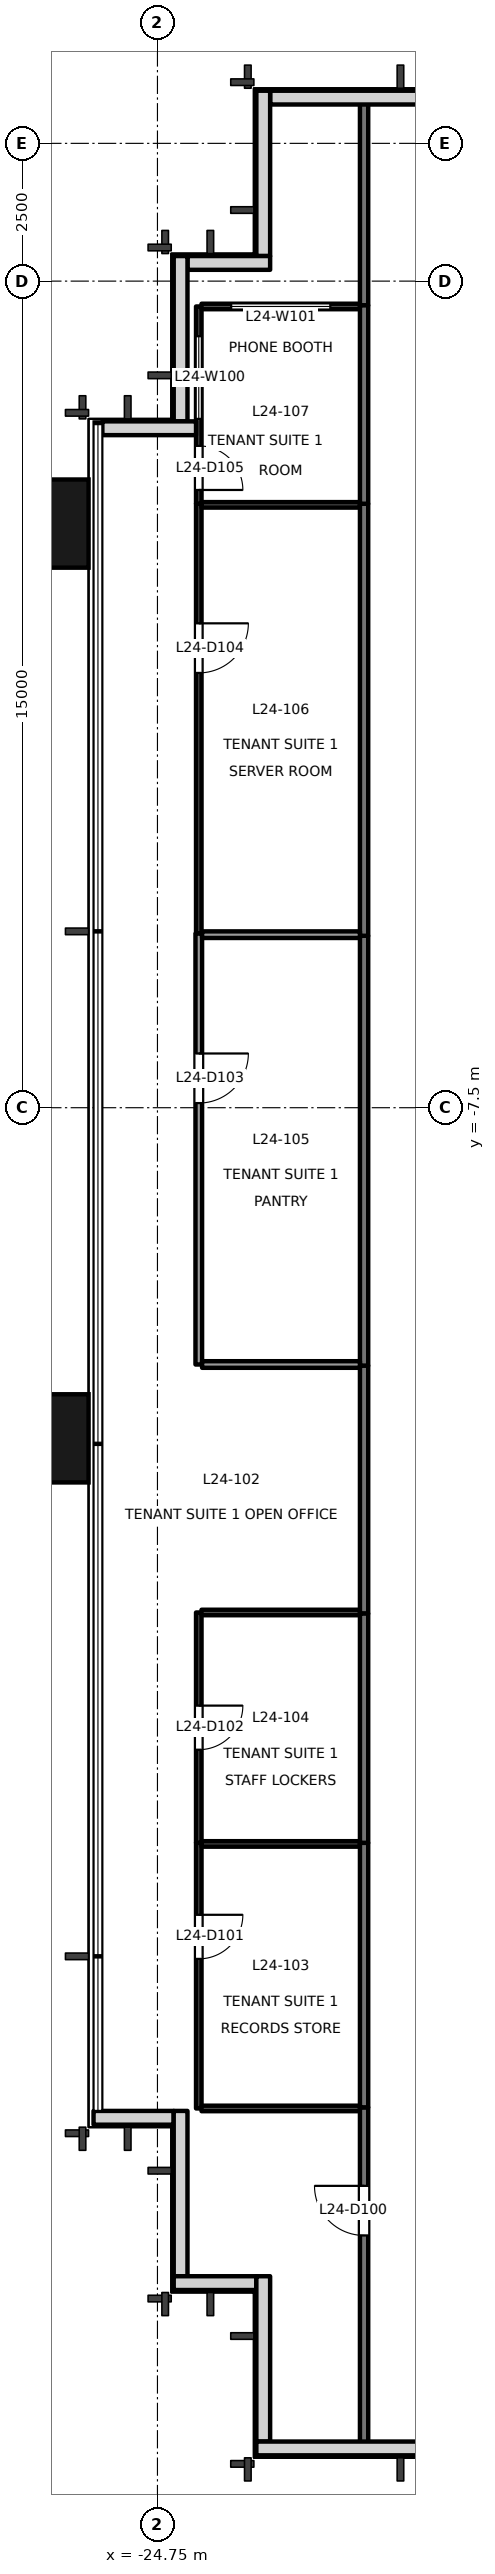
"""IFC4 building model, lengths in metres.
Left out: names, types, materials, properties, quantities, classifications, styles, units other than length and angle.
Written with IfcOpenShell. Run it as: python <this file> out.ifc"""

import sys

from ifc_helpers import new_model, si_unit, direction, frame, frame_2d, origin, origin_2d, place, context, subcontext, project, spatial, rectangle, extrude, element, fill, save


model = new_model("IFC4")
c1 = context("Model", 3, precision=1e-05, world=origin(), true_north=direction((0.0, 1.0)))
c2 = subcontext(c1, "Body", "Model", "MODEL_VIEW")
j1 = project(units=[si_unit("LENGTHUNIT", "METRE"), si_unit("PLANEANGLEUNIT", "RADIAN")], contexts=[c1])
p1 = place(None, origin())
s1 = spatial("IfcSite", under=j1, at=p1, CompositionType="ELEMENT")
p2 = place(p1, origin())
s2 = spatial("IfcBuilding", under=s1, at=p2, CompositionType="ELEMENT")
p3 = place(p2, frame((0.0, 0.0, 107.7)))
s3 = spatial("IfcBuildingStorey", under=s2, at=p3, CompositionType="ELEMENT", Elevation=107.7)
for number, where, z_axis, x_axis in (
    (1, (-26.9, -13.5, -0.2), (0.0, 0.0, 1.0), (0.0, 1.0, 0.0)),
    (2, (-26.9, 3.1, -0.2), (0.0, 0.0, 1.0), (0.0, 1.0, 0.0)),
):
    element("IfcColumn", number, at=place(p3, frame(where, z_axis=z_axis, x_axis=x_axis)), inside=s3, PredefinedType="COLUMN", context=c2, shape_type="SweptSolid", body=[
        extrude(rectangle(XDim=1.6, YDim=1.8, at=origin_2d()), origin(), (0.0, 0.0, 1.0), 4.0),
    ])
p4 = place(p3, frame((-20.0, 10.83, 0.0), z_axis=(0.0, 0.0, 1.0), x_axis=(-1.0, 0.0, 0.0)))
e3 = element("IfcWall", 3, at=p4, inside=s3, PredefinedType="SOLIDWALL", context=c2, shape_type="SweptSolid", body=[
    extrude(rectangle(XDim=2.705, YDim=0.25, at=frame_2d((1.353, 0.0))), origin(), (0.0, 0.0, 1.0), 3.8),
])
p5 = place(p3, frame((-22.83, 10.955, 0.0), z_axis=(0.0, 0.0, 1.0), x_axis=(0.0, -1.0, 0.0)))
e4 = element("IfcWall", 4, at=p5, inside=s3, PredefinedType="SOLIDWALL", context=c2, shape_type="SweptSolid", body=[
    extrude(rectangle(XDim=3.0, YDim=0.25, at=frame_2d((1.5, 0.0))), origin(), (0.0, 0.0, 1.0), 3.8),
])
p6 = place(p3, frame((-22.705, 7.83, 0.0), z_axis=(0.0, 0.0, 1.0), x_axis=(-1.0, 0.0, 0.0)))
e5 = element("IfcWall", 5, at=p6, inside=s3, PredefinedType="SOLIDWALL", context=c2, shape_type="SweptSolid", body=[
    extrude(rectangle(XDim=1.5, YDim=0.25, at=frame_2d((0.75, 0.0))), origin(), (0.0, 0.0, 1.0), 3.8),
])
p7 = place(p3, frame((-24.33, 7.955, 0.0), z_axis=(0.0, 0.0, 1.0), x_axis=(0.0, -1.0, 0.0)))
e6 = element("IfcWall", 6, at=p7, inside=s3, PredefinedType="SOLIDWALL", context=c2, shape_type="SweptSolid", body=[
    extrude(rectangle(XDim=3.0, YDim=0.25, at=frame_2d((1.5, 0.0))), origin(), (0.0, 0.0, 1.0), 3.8),
])
p8 = place(p3, frame((-24.05, 4.83, 0.0), z_axis=(0.0, 0.0, 1.0), x_axis=(-1.0, 0.0, 0.0)))
e7 = element("IfcWall", 7, at=p8, inside=s3, PredefinedType="SOLIDWALL", context=c2, shape_type="SweptSolid", body=[
    extrude(rectangle(XDim=1.7, YDim=0.25, at=frame_2d((0.85, 0.0))), origin(), (0.0, 0.0, 1.0), 3.8),
])
p9 = place(p3, frame((-25.91, -25.83, 0.0), z_axis=(0.0, 0.0, 1.0), x_axis=(1.0, 0.0, 0.0)))
e8 = element("IfcWall", 8, at=p9, inside=s3, PredefinedType="SOLIDWALL", context=c2, shape_type="SweptSolid", body=[
    extrude(rectangle(XDim=1.455, YDim=0.25, at=frame_2d((0.728, 0.0))), origin(), (0.0, 0.0, 1.0), 3.8),
])
p10 = place(p3, frame((-24.33, -25.705, 0.0), z_axis=(0.0, 0.0, 1.0), x_axis=(0.0, -1.0, 0.0)))
e9 = element("IfcWall", 9, at=p10, inside=s3, PredefinedType="SOLIDWALL", context=c2, shape_type="SweptSolid", body=[
    extrude(rectangle(XDim=3.0, YDim=0.25, at=frame_2d((1.5, 0.0))), origin(), (0.0, 0.0, 1.0), 3.8),
])
p11 = place(p3, frame((-24.455, -28.83, 0.0), z_axis=(0.0, 0.0, 1.0), x_axis=(1.0, 0.0, 0.0)))
e10 = element("IfcWall", 10, at=p11, inside=s3, PredefinedType="SOLIDWALL", context=c2, shape_type="SweptSolid", body=[
    extrude(rectangle(XDim=1.5, YDim=0.25, at=frame_2d((0.75, 0.0))), origin(), (0.0, 0.0, 1.0), 3.8),
])
p12 = place(p3, frame((-22.83, -28.705, 0.0), z_axis=(0.0, 0.0, 1.0), x_axis=(0.0, -1.0, 0.0)))
e11 = element("IfcWall", 11, at=p12, inside=s3, PredefinedType="SOLIDWALL", context=c2, shape_type="SweptSolid", body=[
    extrude(rectangle(XDim=3.0, YDim=0.25, at=frame_2d((1.5, 0.0))), origin(), (0.0, 0.0, 1.0), 3.8),
])
p13 = place(p3, frame((-22.955, -31.83, 0.0), z_axis=(0.0, 0.0, 1.0), x_axis=(1.0, 0.0, 0.0)))
e12 = element("IfcWall", 12, at=p13, inside=s3, PredefinedType="SOLIDWALL", context=c2, shape_type="SweptSolid", body=[
    extrude(rectangle(XDim=2.955, YDim=0.25, at=frame_2d((1.478, 0.0))), origin(), (0.0, 0.0, 1.0), 3.8),
])
p14 = place(p3, frame((-21.0, 7.06, 0.0), z_axis=(0.0, 0.0, 1.0), x_axis=(0.0, 1.0, 0.0)))
e13 = element("IfcWall", 13, at=p14, inside=s3, PredefinedType="PARTITIONING", context=c2, shape_type="SweptSolid", body=[
    extrude(rectangle(XDim=3.68, YDim=0.15, at=frame_2d((1.84, 0.0))), origin(), (0.0, 0.0, 1.0), 3.8),
])
p15 = place(p3, frame((-21.0, -31.74, 0.0), z_axis=(0.0, 0.0, 1.0), x_axis=(0.0, 1.0, 0.0)))
e14 = element("IfcWall", 14, at=p15, inside=s3, PredefinedType="PARTITIONING", context=c2, shape_type="SweptSolid", body=[
    extrude(rectangle(XDim=6.1, YDim=0.15, at=frame_2d((3.05, 0.0))), origin(), (0.0, 0.0, 1.0), 3.8),
])
p16 = place(p15, frame((3.775, 0.0, 0.0)))
e15 = element("IfcOpeningElement", 15, at=p16, cuts=e14, PredefinedType="OPENING", context=c2, shape_type="SweptSolid", body=[
    extrude(rectangle(XDim=0.9, YDim=2.1, at=frame_2d((0.45, 1.05))), frame((0.0, 0.085, 0.0), z_axis=(0.0, -1.0, 0.0), x_axis=(1.0, 0.0, 0.0)), (0.0, 0.0, 1.0), 0.171),
])
p17 = place(p3, frame((-21.0, -16.68, 0.0), z_axis=(0.0, 0.0, 1.0), x_axis=(0.0, 1.0, 0.0)))
e16 = element("IfcWall", 16, at=p17, inside=s3, PredefinedType="PARTITIONING", context=c2, shape_type="SweptSolid", body=[
    extrude(rectangle(XDim=4.5, YDim=0.15, at=frame_2d((2.25, 0.0))), origin(), (0.0, 0.0, 1.0), 3.8),
])
p18 = place(p3, frame((-21.0, -25.64, 0.0), z_axis=(0.0, 0.0, 1.0), x_axis=(0.0, 1.0, 0.0)))
e17 = element("IfcWall", 17, at=p18, inside=s3, PredefinedType="PARTITIONING", context=c2, shape_type="SweptSolid", body=[
    extrude(rectangle(XDim=4.8, YDim=0.15, at=frame_2d((2.4, 0.0))), origin(), (0.0, 0.0, 1.0), 3.8),
])
p19 = place(p3, frame((-21.0, -20.84, 0.0), z_axis=(0.0, 0.0, 1.0), x_axis=(0.0, 1.0, 0.0)))
e18 = element("IfcWall", 18, at=p19, inside=s3, PredefinedType="PARTITIONING", context=c2, shape_type="SweptSolid", body=[
    extrude(rectangle(XDim=4.16, YDim=0.15, at=frame_2d((2.08, 0.0))), origin(), (0.0, 0.0, 1.0), 3.8),
])
p20 = place(p3, frame((-21.0, -12.18, 0.0), z_axis=(0.0, 0.0, 1.0), x_axis=(0.0, 1.0, 0.0)))
e19 = element("IfcWall", 19, at=p20, inside=s3, PredefinedType="PARTITIONING", context=c2, shape_type="SweptSolid", body=[
    extrude(rectangle(XDim=7.8, YDim=0.15, at=frame_2d((3.9, 0.0))), origin(), (0.0, 0.0, 1.0), 3.4),
])
p21 = place(p3, frame((-21.0, -4.38, 0.0), z_axis=(0.0, 0.0, 1.0), x_axis=(0.0, 1.0, 0.0)))
e20 = element("IfcWall", 20, at=p21, inside=s3, PredefinedType="PARTITIONING", context=c2, shape_type="SweptSolid", body=[
    extrude(rectangle(XDim=7.84, YDim=0.15, at=frame_2d((3.92, 0.0))), origin(), (0.0, 0.0, 1.0), 3.4),
])
p22 = place(p3, frame((-21.0, 3.46, 0.0), z_axis=(0.0, 0.0, 1.0), x_axis=(0.0, 1.0, 0.0)))
e21 = element("IfcWall", 21, at=p22, inside=s3, PredefinedType="PARTITIONING", context=c2, shape_type="SweptSolid", body=[
    extrude(rectangle(XDim=3.6, YDim=0.15, at=frame_2d((1.8, 0.0))), origin(), (0.0, 0.0, 1.0), 3.4),
])
p23 = place(p3, frame((-24.0, -20.84, 0.0), z_axis=(0.0, 0.0, 1.0), x_axis=(0.0, -1.0, 0.0)))
e22 = element("IfcWall", 22, at=p23, inside=s3, PredefinedType="PARTITIONING", context=c2, shape_type="SweptSolid", body=[
    extrude(rectangle(XDim=4.82, YDim=0.1, at=frame_2d((2.41, 0.0))), origin(), (0.0, 0.0, 1.0), 3.8),
])
p24 = place(p23, frame((1.306, 0.0, 0.0)))
e23 = element("IfcOpeningElement", 23, at=p24, cuts=e22, PredefinedType="OPENING", context=c2, shape_type="SweptSolid", body=[
    extrude(rectangle(XDim=0.8, YDim=2.1, at=frame_2d((0.4, 1.05))), frame((0.0, 0.061, 0.0), z_axis=(0.0, -1.0, 0.0), x_axis=(1.0, 0.0, 0.0)), (0.0, 0.0, 1.0), 0.121),
])
p25 = place(p3, frame((-23.95, -25.66, 0.0), z_axis=(0.0, 0.0, 1.0), x_axis=(1.0, 0.0, 0.0)))
e24 = element("IfcWall", 24, at=p25, inside=s3, PredefinedType="PARTITIONING", context=c2, shape_type="SweptSolid", body=[
    extrude(rectangle(XDim=2.875, YDim=0.1, at=frame_2d((1.438, 0.0))), origin(), (0.0, 0.0, 1.0), 3.8),
])
p26 = place(p3, frame((-24.0, -16.66, 0.0), z_axis=(0.0, 0.0, 1.0), x_axis=(0.0, -1.0, 0.0)))
e25 = element("IfcWall", 25, at=p26, inside=s3, PredefinedType="PARTITIONING", context=c2, shape_type="SweptSolid", body=[
    extrude(rectangle(XDim=4.18, YDim=0.1, at=frame_2d((2.09, 0.0))), origin(), (0.0, 0.0, 1.0), 3.8),
])
p27 = place(p26, frame((1.69, 0.0, 0.0)))
e26 = element("IfcOpeningElement", 26, at=p27, cuts=e25, PredefinedType="OPENING", context=c2, shape_type="SweptSolid", body=[
    extrude(rectangle(XDim=0.8, YDim=2.1, at=frame_2d((0.4, 1.05))), frame((0.0, 0.061, 0.0), z_axis=(0.0, -1.0, 0.0), x_axis=(1.0, 0.0, 0.0)), (0.0, 0.0, 1.0), 0.121),
])
p28 = place(p3, frame((-21.075, -16.66, 0.0), z_axis=(0.0, 0.0, 1.0), x_axis=(-1.0, 0.0, 0.0)))
e27 = element("IfcWall", 27, at=p28, inside=s3, PredefinedType="PARTITIONING", context=c2, shape_type="SweptSolid", body=[
    extrude(rectangle(XDim=2.875, YDim=0.1, at=frame_2d((1.438, 0.0))), origin(), (0.0, 0.0, 1.0), 3.8),
])
p29 = place(p3, frame((-24.0, -4.34, 0.0), z_axis=(0.0, 0.0, 1.0), x_axis=(0.0, -1.0, 0.0)))
e28 = element("IfcWall", 28, at=p29, inside=s3, PredefinedType="PARTITIONING", context=c2, shape_type="SweptSolid", body=[
    extrude(rectangle(XDim=7.82, YDim=0.12, at=frame_2d((3.91, 0.0))), origin(), (0.0, 0.0, 1.0), 3.4),
])
p30 = place(p29, frame((2.176, 0.0, 0.0)))
e29 = element("IfcOpeningElement", 29, at=p30, cuts=e28, PredefinedType="OPENING", context=c2, shape_type="SweptSolid", body=[
    extrude(rectangle(XDim=0.9, YDim=2.1, at=frame_2d((0.45, 1.05))), frame((0.0, 0.071, 0.0), z_axis=(0.0, -1.0, 0.0), x_axis=(1.0, 0.0, 0.0)), (0.0, 0.0, 1.0), 0.141),
])
p31 = place(p3, frame((-23.94, -12.16, 0.0), z_axis=(0.0, 0.0, 1.0), x_axis=(1.0, 0.0, 0.0)))
e30 = element("IfcWall", 30, at=p31, inside=s3, PredefinedType="PARTITIONING", context=c2, shape_type="SweptSolid", body=[
    extrude(rectangle(XDim=2.865, YDim=0.12, at=frame_2d((1.433, 0.0))), origin(), (0.0, 0.0, 1.0), 3.8),
])
p32 = place(p3, frame((-24.0, 3.46, 0.0), z_axis=(0.0, 0.0, 1.0), x_axis=(0.0, -1.0, 0.0)))
e31 = element("IfcWall", 31, at=p32, inside=s3, PredefinedType="PARTITIONING", context=c2, shape_type="SweptSolid", body=[
    extrude(rectangle(XDim=7.8, YDim=0.1, at=frame_2d((3.9, 0.0))), origin(), (0.0, 0.0, 1.0), 3.4),
])
p33 = place(p32, frame((2.17, 0.0, 0.0)))
e32 = element("IfcOpeningElement", 32, at=p33, cuts=e31, PredefinedType="OPENING", context=c2, shape_type="SweptSolid", body=[
    extrude(rectangle(XDim=0.9, YDim=2.1, at=frame_2d((0.45, 1.05))), frame((0.0, 0.061, 0.0), z_axis=(0.0, -1.0, 0.0), x_axis=(1.0, 0.0, 0.0)), (0.0, 0.0, 1.0), 0.121),
])
p34 = place(p3, frame((-24.0, 7.04, 0.0), z_axis=(0.0, 0.0, 1.0), x_axis=(0.0, -1.0, 0.0)))
e33 = element("IfcWall", 33, at=p34, inside=s3, PredefinedType="PARTITIONING", context=c2, shape_type="SweptSolid", body=[
    extrude(rectangle(XDim=3.58, YDim=0.1, at=frame_2d((1.79, 0.0))), origin(), (0.0, 0.0, 1.0), 3.4),
])
p35 = place(p34, frame((2.53, 0.0, 0.0)))
e34 = element("IfcOpeningElement", 34, at=p35, cuts=e33, PredefinedType="OPENING", context=c2, shape_type="SweptSolid", body=[
    extrude(rectangle(XDim=0.8, YDim=2.1, at=frame_2d((0.4, 1.05))), frame((0.0, 0.061, 0.0), z_axis=(0.0, -1.0, 0.0), x_axis=(1.0, 0.0, 0.0)), (0.0, 0.0, 1.0), 0.121),
])
p36 = place(p34, frame((0.54, 0.0, 0.9)))
e35 = element("IfcOpeningElement", 35, at=p36, cuts=e33, PredefinedType="OPENING", context=c2, shape_type="SweptSolid", body=[
    extrude(rectangle(XDim=1.5, YDim=1.2, at=frame_2d((0.75, 0.6))), frame((0.0, 0.061, 0.0), z_axis=(0.0, -1.0, 0.0), x_axis=(1.0, 0.0, 0.0)), (0.0, 0.0, 1.0), 0.121),
])
p37 = place(p3, frame((-21.075, 7.04, 0.0), z_axis=(0.0, 0.0, 1.0), x_axis=(-1.0, 0.0, 0.0)))
e36 = element("IfcWall", 36, at=p37, inside=s3, PredefinedType="PARTITIONING", context=c2, shape_type="SweptSolid", body=[
    extrude(rectangle(XDim=2.875, YDim=0.1, at=frame_2d((1.438, 0.0))), origin(), (0.0, 0.0, 1.0), 3.8),
])
p38 = place(p37, frame((0.537, 0.0, 0.9)))
e37 = element("IfcOpeningElement", 37, at=p38, cuts=e36, PredefinedType="OPENING", context=c2, shape_type="SweptSolid", body=[
    extrude(rectangle(XDim=1.8, YDim=1.2, at=frame_2d((0.9, 0.6))), frame((0.0, 0.061, 0.0), z_axis=(0.0, -1.0, 0.0), x_axis=(1.0, 0.0, 0.0)), (0.0, 0.0, 1.0), 0.121),
])
p39 = place(p3, frame((-23.95, -20.86, 0.0), z_axis=(0.0, 0.0, 1.0), x_axis=(1.0, 0.0, 0.0)))
e38 = element("IfcWall", 38, at=p39, inside=s3, PredefinedType="PARTITIONING", context=c2, shape_type="SweptSolid", body=[
    extrude(rectangle(XDim=2.875, YDim=0.1, at=frame_2d((1.438, 0.0))), origin(), (0.0, 0.0, 1.0), 3.8),
])
p40 = place(p3, frame((-23.94, -4.36, 0.0), z_axis=(0.0, 0.0, 1.0), x_axis=(1.0, 0.0, 0.0)))
e39 = element("IfcWall", 39, at=p40, inside=s3, PredefinedType="PARTITIONING", context=c2, shape_type="SweptSolid", body=[
    extrude(rectangle(XDim=2.865, YDim=0.12, at=frame_2d((1.433, 0.0))), origin(), (0.0, 0.0, 1.0), 3.4),
])
p41 = place(p3, frame((-23.95, 3.44, 0.0), z_axis=(0.0, 0.0, 1.0), x_axis=(1.0, 0.0, 0.0)))
e40 = element("IfcWall", 40, at=p41, inside=s3, PredefinedType="PARTITIONING", context=c2, shape_type="SweptSolid", body=[
    extrude(rectangle(XDim=2.875, YDim=0.1, at=frame_2d((1.438, 0.0))), origin(), (0.0, 0.0, 1.0), 3.8),
])
p42 = place(p16, origin())
e41 = element("IfcDoor", 41, at=p42, inside=s3, OperationType="SINGLE_SWING_RIGHT", PredefinedType="DOOR", context=c2, shape_type="SweptSolid", body=[
    extrude(rectangle(XDim=0.9, YDim=2.1, at=frame_2d((0.45, 1.05))), frame((0.0, 0.025, 0.0), z_axis=(0.0, -1.0, 0.0), x_axis=(1.0, 0.0, 0.0)), (0.0, 0.0, 1.0), 0.05),
])
fill(e15, e41)
p43 = place(p24, origin())
e42 = element("IfcDoor", 42, at=p43, inside=s3, OperationType="SINGLE_SWING_LEFT", PredefinedType="DOOR", context=c2, shape_type="SweptSolid", body=[
    extrude(rectangle(XDim=0.8, YDim=2.1, at=frame_2d((0.4, 1.05))), frame((0.0, 0.025, 0.0), z_axis=(0.0, -1.0, 0.0), x_axis=(1.0, 0.0, 0.0)), (0.0, 0.0, 1.0), 0.05),
])
fill(e23, e42)
p44 = place(p27, origin())
e43 = element("IfcDoor", 43, at=p44, inside=s3, OperationType="SINGLE_SWING_LEFT", PredefinedType="DOOR", context=c2, shape_type="SweptSolid", body=[
    extrude(rectangle(XDim=0.8, YDim=2.1, at=frame_2d((0.4, 1.05))), frame((0.0, 0.025, 0.0), z_axis=(0.0, -1.0, 0.0), x_axis=(1.0, 0.0, 0.0)), (0.0, 0.0, 1.0), 0.05),
])
fill(e26, e43)
p45 = place(p30, origin())
e44 = element("IfcDoor", 44, at=p45, inside=s3, OperationType="SINGLE_SWING_LEFT", PredefinedType="DOOR", context=c2, shape_type="SweptSolid", body=[
    extrude(rectangle(XDim=0.9, YDim=2.1, at=frame_2d((0.45, 1.05))), frame((0.0, 0.025, 0.0), z_axis=(0.0, -1.0, 0.0), x_axis=(1.0, 0.0, 0.0)), (0.0, 0.0, 1.0), 0.05),
])
fill(e29, e44)
p46 = place(p33, origin())
e45 = element("IfcDoor", 45, at=p46, inside=s3, OperationType="SINGLE_SWING_LEFT", PredefinedType="DOOR", context=c2, shape_type="SweptSolid", body=[
    extrude(rectangle(XDim=0.9, YDim=2.1, at=frame_2d((0.45, 1.05))), frame((0.0, 0.025, 0.0), z_axis=(0.0, -1.0, 0.0), x_axis=(1.0, 0.0, 0.0)), (0.0, 0.0, 1.0), 0.05),
])
fill(e32, e45)
p47 = place(p35, origin())
e46 = element("IfcDoor", 46, at=p47, inside=s3, OperationType="SINGLE_SWING_RIGHT", PredefinedType="DOOR", context=c2, shape_type="SweptSolid", body=[
    extrude(rectangle(XDim=0.8, YDim=2.1, at=frame_2d((0.4, 1.05))), frame((0.0, 0.025, 0.0), z_axis=(0.0, -1.0, 0.0), x_axis=(1.0, 0.0, 0.0)), (0.0, 0.0, 1.0), 0.05),
])
fill(e34, e46)
p48 = place(p36, origin())
e47 = element("IfcWindow", 47, at=p48, inside=s3, PartitioningType="SINGLE_PANEL", PredefinedType="WINDOW", context=c2, shape_type="SweptSolid", body=[
    extrude(rectangle(XDim=1.5, YDim=1.2, at=frame_2d((0.75, 0.6))), frame((0.0, 0.03, 0.0), z_axis=(0.0, -1.0, 0.0), x_axis=(1.0, 0.0, 0.0)), (0.0, 0.0, 1.0), 0.06),
])
fill(e35, e47)
p49 = place(p38, origin())
e48 = element("IfcWindow", 48, at=p49, inside=s3, PartitioningType="SINGLE_PANEL", PredefinedType="WINDOW", context=c2, shape_type="SweptSolid", body=[
    extrude(rectangle(XDim=1.8, YDim=1.2, at=frame_2d((0.9, 0.6))), frame((0.0, 0.03, 0.0), z_axis=(0.0, -1.0, 0.0), x_axis=(1.0, 0.0, 0.0)), (0.0, 0.0, 1.0), 0.06),
])
fill(e37, e48)
save(model, sys.argv[1])
